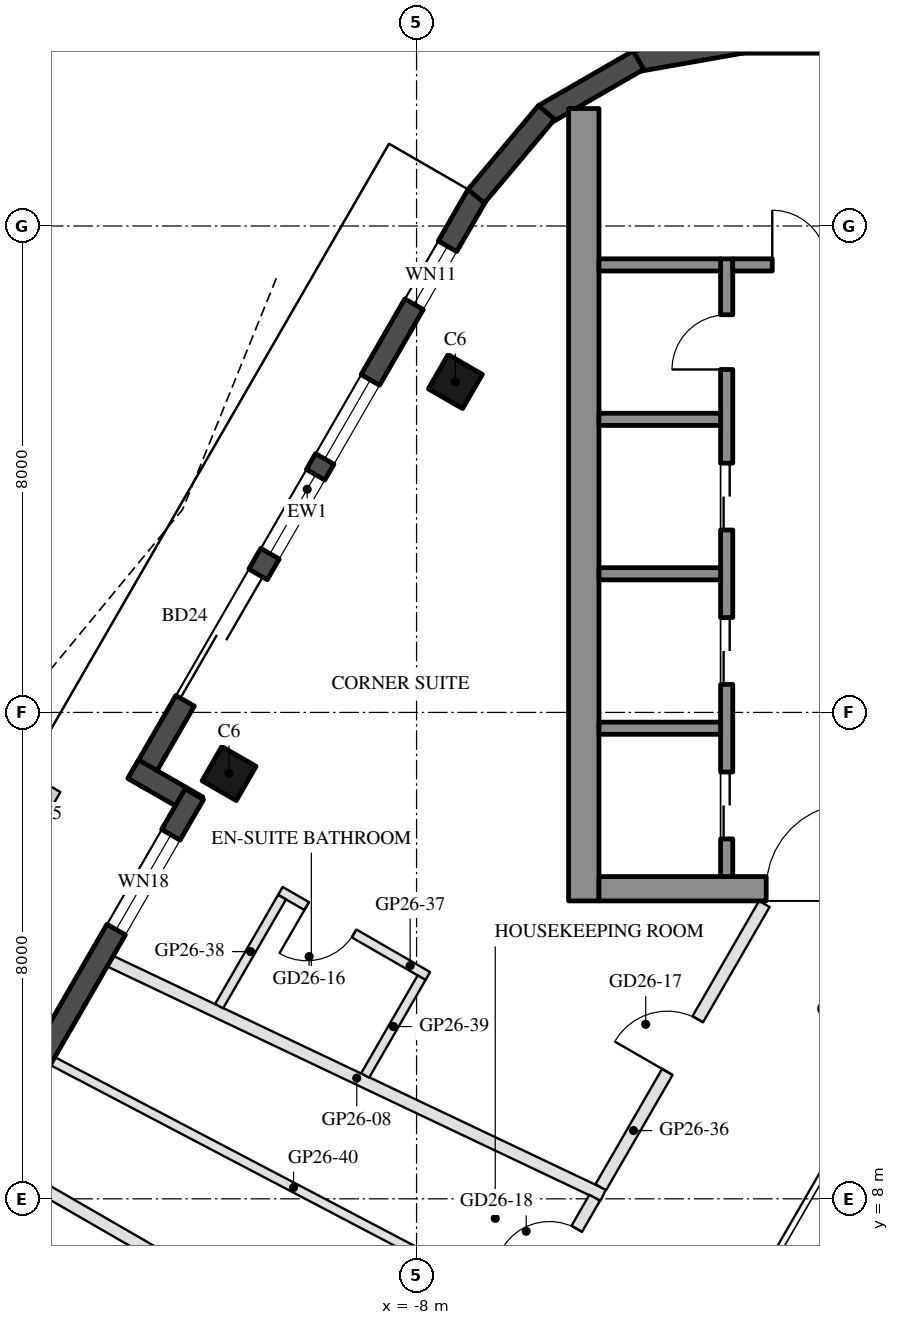
"""IFC4 building model, lengths in metres.
Left out: names, types, materials, properties, quantities, classifications, styles, units other than length and angle.
Written with IfcOpenShell. Run it as: python <this file> out.ifc"""

import sys

from ifc_helpers import new_model, si_unit, direction, frame, frame_2d, origin, origin_2d, place, context, subcontext, project, spatial, rectangle, hollow_rectangle, extrude, boolean, halfspace, element, fill, save


model = new_model("IFC4")
c1 = context("Model", 3, precision=1e-05, world=origin(), true_north=direction((0.0, 1.0)))
c2 = subcontext(c1, "Body", "Model", "MODEL_VIEW")
j1 = project(units=[si_unit("LENGTHUNIT", "METRE"), si_unit("PLANEANGLEUNIT", "RADIAN")], contexts=[c1])
p1 = place(None, origin())
s1 = spatial("IfcSite", under=j1, at=p1, CompositionType="ELEMENT")
p2 = place(p1, origin())
s2 = spatial("IfcBuilding", under=s1, at=p2, CompositionType="ELEMENT")
p3 = place(p2, frame((0.0, 0.0, 268.9)))
s3 = spatial("IfcBuildingStorey", under=s2, at=p3, CompositionType="ELEMENT", Elevation=268.9)
p4 = place(p3, frame((-7.362, 21.44, 0.0), z_axis=(0.0, 0.0, 1.0), x_axis=(0.5, 0.866025403784, 0.0)))
e1 = element("IfcColumn", 1, at=p4, inside=s3, PredefinedType="COLUMN", context=c2, shape_type="SweptSolid", body=[
    boolean("DIFFERENCE", extrude(hollow_rectangle(XDim=0.65, YDim=0.65, WallThickness=0.03, at=origin_2d()), origin(), (0.0, 0.0, 1.0), 3.7), halfspace(frame((0.0, 0.0, 0.047), z_axis=(0.0, 0.0, 1.0), x_axis=(1.0, 0.0, 0.0)), True)),
])
p5 = place(p3, frame((-11.083, 14.994, 0.0), z_axis=(0.0, 0.0, 1.0), x_axis=(0.5, 0.866025403784, 0.0)))
e2 = element("IfcColumn", 2, at=p5, inside=s3, PredefinedType="COLUMN", context=c2, shape_type="SweptSolid", body=[
    boolean("DIFFERENCE", extrude(hollow_rectangle(XDim=0.65, YDim=0.65, WallThickness=0.03, at=origin_2d()), origin(), (0.0, 0.0, 1.0), 3.7), halfspace(frame((0.0, 0.0, 0.04), z_axis=(0.0, 0.0, 1.0), x_axis=(1.0, 0.0, 0.0)), True)),
])
p6 = place(p3, frame((-7.002, 24.514, 0.0), z_axis=(0.0, 0.0, 1.0), x_axis=(-0.500000830309, -0.866024924405, 0.0)))
e3 = element("IfcWall", 3, at=p6, inside=s3, PredefinedType="SOLIDWALL", context=c2, shape_type="SweptSolid", body=[
    extrude(rectangle(XDim=11.185, YDim=0.35, at=frame_2d((5.593, 0.0))), origin(), (0.0, 0.0, 1.0), 3.55),
])
p7 = place(p6, frame((0.979, 0.0, 0.3)))
e4 = element("IfcOpeningElement", 4, at=p7, cuts=e3, PredefinedType="OPENING", context=c2, shape_type="SweptSolid", body=[
    extrude(rectangle(XDim=1.1, YDim=2.65, at=frame_2d((0.55, 1.325))), frame((0.0, 0.185, 0.0), z_axis=(0.0, -1.0, 0.0), x_axis=(1.0, 0.0, 0.0)), (0.0, 0.0, 1.0), 0.37),
])
p8 = place(p6, frame((7.21, 0.0, 0.0)))
e5 = element("IfcOpeningElement", 5, at=p8, cuts=e3, PredefinedType="OPENING", context=c2, shape_type="SweptSolid", body=[
    extrude(rectangle(XDim=2.4, YDim=2.4, at=frame_2d((1.2, 1.2))), frame((0.0, 0.185, 0.0), z_axis=(0.0, -1.0, 0.0), x_axis=(1.0, 0.0, 0.0)), (0.0, 0.0, 1.0), 0.37),
])
p9 = place(p6, frame((3.517, 0.0, 0.3)))
e6 = element("IfcOpeningElement", 6, at=p9, cuts=e3, PredefinedType="OPENING", context=c2, shape_type="SweptSolid", body=[
    extrude(rectangle(XDim=1.5, YDim=2.65, at=frame_2d((0.75, 1.325))), frame((0.0, 0.185, 0.0), z_axis=(0.0, -1.0, 0.0), x_axis=(1.0, 0.0, 0.0)), (0.0, 0.0, 1.0), 0.37),
])
p10 = place(p6, frame((5.316, 0.0, 0.3)))
e7 = element("IfcOpeningElement", 7, at=p10, cuts=e3, PredefinedType="OPENING", context=c2, shape_type="SweptSolid", body=[
    extrude(rectangle(XDim=1.5, YDim=2.65, at=frame_2d((0.75, 1.325))), frame((0.0, 0.185, 0.0), z_axis=(0.0, -1.0, 0.0), x_axis=(1.0, 0.0, 0.0)), (0.0, 0.0, 1.0), 0.37),
])
p11 = place(p3, frame((-12.659, 15.066, 0.0), z_axis=(0.0, 0.0, 1.0), x_axis=(0.866005645448, -0.500034220881, 0.0)))
e8 = element("IfcWall", 8, at=p11, inside=s3, PredefinedType="SOLIDWALL", context=c2, shape_type="SweptSolid", body=[
    extrude(rectangle(XDim=1.22, YDim=0.35, at=frame_2d((0.61, 0.0))), origin(), (0.0, 0.0, 1.0), 3.55),
])
p12 = place(p3, frame((-11.655, 14.655, 0.0), z_axis=(0.0, 0.0, 1.0), x_axis=(-0.499995993298, -0.866027717042, 0.0)))
e9 = element("IfcWall", 9, at=p12, inside=s3, PredefinedType="SOLIDWALL", context=c2, shape_type="SweptSolid", body=[
    extrude(rectangle(XDim=6.284, YDim=0.35, at=frame_2d((3.142, 0.0))), origin(), (0.0, 0.0, 1.0), 3.55),
])
p13 = place(p12, frame((0.77, 0.0, 0.3)))
e10 = element("IfcOpeningElement", 10, at=p13, cuts=e9, PredefinedType="OPENING", context=c2, shape_type="SweptSolid", body=[
    extrude(rectangle(XDim=1.8, YDim=2.65, at=frame_2d((0.9, 1.325))), frame((0.0, 0.185, 0.0), z_axis=(0.0, -1.0, 0.0), x_axis=(1.0, 0.0, 0.0)), (0.0, 0.0, 1.0), 0.37),
])
p14 = place(p3, frame((2.666, 27.018, 0.0), z_axis=(0.0, 0.0, 1.0), x_axis=(-1.0, 0.0, 0.0)))
e11 = element("IfcWall", 11, at=p14, inside=s3, PredefinedType="SOLIDWALL", context=c2, shape_type="SweptSolid", body=[
    extrude(rectangle(XDim=5.331, YDim=0.35, at=frame_2d((2.666, 0.0))), origin(), (0.0, 0.0, 1.0), 3.55),
])
for number, where, z_axis, x_axis in (
    (12, (-2.635, 27.02, 0.0), (0.0, 0.0, 1.0), (-0.985, -0.174, 0.0)),
    (13, (-4.351, 26.729, 0.0), (0.0, 0.0, 1.0), (-0.866, -0.5, 0.0)),
):
    element("IfcWall", number, at=place(p3, frame(where, z_axis=z_axis, x_axis=x_axis)), inside=s3, PredefinedType="SOLIDWALL", context=c2, shape_type="SweptSolid", body=[
        extrude(rectangle(XDim=1.8, YDim=0.35, at=frame_2d((0.9, 0.0))), origin(), (0.0, 0.0, 1.0), 3.55),
    ])
p15 = place(p3, frame((-5.863, 25.868, 0.0), z_axis=(0.0, 0.0, 1.0), x_axis=(-0.642756114672, -0.766070869471, 0.0)))
e14 = element("IfcWall", 14, at=p15, inside=s3, PredefinedType="SOLIDWALL", context=c2, shape_type="SweptSolid", body=[
    extrude(rectangle(XDim=1.8, YDim=0.35, at=frame_2d((0.9, 0.0))), origin(), (0.0, 0.0, 1.0), 3.55),
])
p16 = place(p3, frame((-5.25, 12.9, 0.0), z_axis=(0.0, 0.0, 1.0), x_axis=(0.0, 1.0, 0.0)))
e15 = element("IfcWall", 15, at=p16, inside=s3, PredefinedType="SHEAR", context=c2, shape_type="SweptSolid", body=[
    extrude(rectangle(XDim=13.031, YDim=0.5, at=frame_2d((6.516, 0.0))), origin(), (0.0, 0.0, 1.0), 3.5),
])
p17 = place(p3, frame((5.0, 13.1, 0.0), z_axis=(0.0, 0.0, 1.0), x_axis=(-1.0, 0.0, 0.0)))
e16 = element("IfcWall", 16, at=p17, inside=s3, PredefinedType="SHEAR", context=c2, shape_type="SweptSolid", body=[
    extrude(rectangle(XDim=10.0, YDim=0.4, at=frame_2d((5.0, 0.0))), origin(), (0.0, 0.0, 1.0), 3.5),
])
p18 = place(p17, frame((3.55, 0.0, 0.0)))
e17 = element("IfcOpeningElement", 17, at=p18, cuts=e16, PredefinedType="OPENING", context=c2, shape_type="SweptSolid", body=[
    extrude(rectangle(XDim=1.1, YDim=2.1, at=frame_2d((0.55, 1.05))), frame((0.0, 0.21, 0.0), z_axis=(0.0, -1.0, 0.0), x_axis=(1.0, 0.0, 0.0)), (0.0, 0.0, 1.0), 0.42),
])
p19 = place(p17, frame((5.85, 0.0, 0.0)))
e18 = element("IfcOpeningElement", 18, at=p19, cuts=e16, PredefinedType="OPENING", context=c2, shape_type="SweptSolid", body=[
    extrude(rectangle(XDim=1.4, YDim=2.1, at=frame_2d((0.7, 1.05))), frame((0.0, 0.21, 0.0), z_axis=(0.0, -1.0, 0.0), x_axis=(1.0, 0.0, 0.0)), (0.0, 0.0, 1.0), 0.42),
])
p20 = place(p3, frame((-2.9, 13.3, 0.0), z_axis=(0.0, 0.0, 1.0), x_axis=(0.0, 1.0, 0.0)))
e19 = element("IfcWall", 19, at=p20, inside=s3, PredefinedType="SHEAR", context=c2, shape_type="SweptSolid", body=[
    extrude(rectangle(XDim=10.16, YDim=0.2, at=frame_2d((5.08, 0.0))), origin(), (0.0, 0.0, 1.0), 3.5),
])
p21 = place(p20, frame((0.62, 0.0, 0.0)))
e20 = element("IfcOpeningElement", 20, at=p21, cuts=e19, PredefinedType="OPENING", context=c2, shape_type="SweptSolid", body=[
    extrude(rectangle(XDim=1.1, YDim=2.1, at=frame_2d((0.55, 1.05))), frame((0.0, 0.11, 0.0), z_axis=(0.0, -1.0, 0.0), x_axis=(1.0, 0.0, 0.0)), (0.0, 0.0, 1.0), 0.22),
])
p22 = place(p20, frame((3.16, 0.0, 0.0)))
e21 = element("IfcOpeningElement", 21, at=p22, cuts=e19, PredefinedType="OPENING", context=c2, shape_type="SweptSolid", body=[
    extrude(rectangle(XDim=1.1, YDim=2.1, at=frame_2d((0.55, 1.05))), frame((0.0, 0.11, 0.0), z_axis=(0.0, -1.0, 0.0), x_axis=(1.0, 0.0, 0.0)), (0.0, 0.0, 1.0), 0.22),
])
p23 = place(p20, frame((5.7, 0.0, 0.0)))
e22 = element("IfcOpeningElement", 22, at=p23, cuts=e19, PredefinedType="OPENING", context=c2, shape_type="SweptSolid", body=[
    extrude(rectangle(XDim=1.1, YDim=2.1, at=frame_2d((0.55, 1.05))), frame((0.0, 0.11, 0.0), z_axis=(0.0, -1.0, 0.0), x_axis=(1.0, 0.0, 0.0)), (0.0, 0.0, 1.0), 0.22),
])
p24 = place(p20, frame((8.34, 0.0, 0.0)))
e23 = element("IfcOpeningElement", 23, at=p24, cuts=e19, PredefinedType="OPENING", context=c2, shape_type="SweptSolid", body=[
    extrude(rectangle(XDim=0.9, YDim=2.1, at=frame_2d((0.45, 1.05))), frame((0.0, 0.11, 0.0), z_axis=(0.0, -1.0, 0.0), x_axis=(1.0, 0.0, 0.0)), (0.0, 0.0, 1.0), 0.22),
])
p25 = place(p3, frame((-0.4, 23.36, 0.0), z_axis=(0.0, 0.0, 1.0), x_axis=(-1.0, 0.0, 0.0)))
e24 = element("IfcWall", 24, at=p25, inside=s3, PredefinedType="SHEAR", context=c2, shape_type="SweptSolid", body=[
    extrude(rectangle(XDim=2.4, YDim=0.2, at=frame_2d((1.2, 0.0))), origin(), (0.0, 0.0, 1.0), 3.5),
])
p26 = place(p25, frame((0.85, 0.0, 0.0)))
e25 = element("IfcOpeningElement", 25, at=p26, cuts=e24, PredefinedType="OPENING", context=c2, shape_type="SweptSolid", body=[
    extrude(rectangle(XDim=0.9, YDim=2.1, at=frame_2d((0.45, 1.05))), frame((0.0, 0.11, 0.0), z_axis=(0.0, -1.0, 0.0), x_axis=(1.0, 0.0, 0.0)), (0.0, 0.0, 1.0), 0.22),
])
for number, where, z_axis, x_axis in (
    (26, (-3.0, 15.74, 0.0), (0.0, 0.0, 1.0), (-1.0, 0.0, 0.0)),
    (27, (-3.0, 18.28, 0.0), (0.0, 0.0, 1.0), (-1.0, 0.0, 0.0)),
    (28, (-3.0, 20.82, 0.0), (0.0, 0.0, 1.0), (-1.0, 0.0, 0.0)),
    (29, (-3.0, 23.36, 0.0), (0.0, 0.0, 1.0), (-1.0, 0.0, 0.0)),
):
    element("IfcWall", number, at=place(p3, frame(where, z_axis=z_axis, x_axis=x_axis)), inside=s3, PredefinedType="SHEAR", context=c2, shape_type="SweptSolid", body=[
        extrude(rectangle(XDim=2.0, YDim=0.2, at=frame_2d((1.0, 0.0))), origin(), (0.0, 0.0, 1.0), 3.5),
    ])
p27 = place(p3, frame((-13.038, 11.909, 0.0), z_axis=(0.0, 0.0, 1.0), x_axis=(0.903427417518, -0.428741065536, 0.0)))
e30 = element("IfcWall", 30, at=p27, inside=s3, PredefinedType="PARTITIONING", context=c2, shape_type="SweptSolid", body=[
    extrude(rectangle(XDim=8.975, YDim=0.2, at=frame_2d((4.487, 0.0))), origin(), (0.0, 0.0, 1.0), 3.0),
])
p28 = place(p3, frame((-14.524, 8.385, 0.0), z_axis=(0.0, 0.0, 1.0), x_axis=(0.866015680395, -0.500016841027, 0.0)))
e31 = element("IfcWall", 31, at=p28, inside=s3, PredefinedType="PARTITIONING", context=c2, shape_type="SweptSolid", body=[
    extrude(rectangle(XDim=8.471, YDim=0.2, at=frame_2d((4.235, 0.0))), origin(), (0.0, 0.0, 1.0), 3.0),
])
p29 = place(p3, frame((-4.97, 8.191, 0.0), z_axis=(0.0, 0.0, 1.0), x_axis=(0.499994808408, 0.866028401131, 0.0)))
e32 = element("IfcWall", 32, at=p29, inside=s3, PredefinedType="PARTITIONING", context=c2, shape_type="SweptSolid", body=[
    extrude(rectangle(XDim=5.38, YDim=0.2, at=frame_2d((2.69, 0.0))), origin(), (0.0, 0.0, 1.0), 3.0),
])
p30 = place(p29, frame((2.19, 0.0, 0.0)))
e33 = element("IfcOpeningElement", 33, at=p30, cuts=e32, PredefinedType="OPENING", context=c2, shape_type="SweptSolid", body=[
    extrude(rectangle(XDim=1.0, YDim=2.1, at=frame_2d((0.5, 1.05))), frame((0.0, 0.11, 0.0), z_axis=(0.0, -1.0, 0.0), x_axis=(1.0, 0.0, 0.0)), (0.0, 0.0, 1.0), 0.22),
])
p31 = place(p3, frame((-7.815, 11.665, 0.0), z_axis=(0.0, 0.0, 1.0), x_axis=(-0.865996816683, 0.500049511043, 0.0)))
e34 = element("IfcWall", 34, at=p31, inside=s3, PredefinedType="PARTITIONING", context=c2, shape_type="SweptSolid", body=[
    extrude(rectangle(XDim=2.8, YDim=0.15, at=frame_2d((1.4, 0.0))), origin(), (0.0, 0.0, 1.0), 3.55),
])
p32 = place(p31, frame((1.4, 0.0, 0.0)))
e35 = element("IfcOpeningElement", 35, at=p32, cuts=e34, PredefinedType="OPENING", context=c2, shape_type="SweptSolid", body=[
    extrude(rectangle(XDim=0.9, YDim=2.1, at=frame_2d((0.45, 1.05))), frame((0.0, 0.085, 0.0), z_axis=(0.0, -1.0, 0.0), x_axis=(1.0, 0.0, 0.0)), (0.0, 0.0, 1.0), 0.17),
])
p33 = place(p3, frame((-10.212, 12.962, 0.0), z_axis=(0.0, 0.0, 1.0), x_axis=(-0.500008344384, -0.866020586098, 0.0)))
e36 = element("IfcWall", 36, at=p33, inside=s3, PredefinedType="PARTITIONING", context=c2, shape_type="SweptSolid", body=[
    extrude(rectangle(XDim=2.07, YDim=0.15, at=frame_2d((1.035, 0.0))), origin(), (0.0, 0.0, 1.0), 3.55),
])
p34 = place(p3, frame((-7.917, 11.637, 0.0), z_axis=(0.0, 0.0, 1.0), x_axis=(-0.500071598593, -0.865984062371, 0.0)))
e37 = element("IfcWall", 37, at=p34, inside=s3, PredefinedType="PARTITIONING", context=c2, shape_type="SweptSolid", body=[
    extrude(rectangle(XDim=1.856, YDim=0.15, at=frame_2d((0.928, 0.0))), origin(), (0.0, 0.0, 1.0), 3.55),
])
p35 = place(p3, frame((-13.987, 10.266, 0.0), z_axis=(0.0, 0.0, 1.0), x_axis=(0.885474206285, -0.464688530097, 0.0)))
e38 = element("IfcWall", 38, at=p35, inside=s3, PredefinedType="PARTITIONING", context=c2, shape_type="SweptSolid", body=[
    extrude(rectangle(XDim=8.953, YDim=0.15, at=frame_2d((4.477, 0.0))), origin(), (0.0, 0.0, 1.0), 3.16),
])
p36 = place(p3, frame((-6.11, 6.217, 0.0), z_axis=(0.0, 0.0, 1.0), x_axis=(0.500017307165, 0.866015411258, 0.0)))
e39 = element("IfcWall", 39, at=p36, inside=s3, PredefinedType="PARTITIONING", context=c2, shape_type="SweptSolid", body=[
    extrude(rectangle(XDim=2.079, YDim=0.2, at=frame_2d((1.039, 0.0))), origin(), (0.0, 0.0, 1.0), 3.0),
])
p37 = place(p36, frame((0.589, 0.0, 0.0)))
e40 = element("IfcOpeningElement", 40, at=p37, cuts=e39, PredefinedType="OPENING", context=c2, shape_type="SweptSolid", body=[
    extrude(rectangle(XDim=0.9, YDim=2.1, at=frame_2d((0.45, 1.05))), frame((0.0, 0.11, 0.0), z_axis=(0.0, -1.0, 0.0), x_axis=(1.0, 0.0, 0.0)), (0.0, 0.0, 1.0), 0.22),
])
p38 = place(p7, origin())
e41 = element("IfcWindow", 41, at=p38, inside=s3, PartitioningType="SINGLE_PANEL", PredefinedType="WINDOW", context=c2, shape_type="SweptSolid", body=[
    extrude(rectangle(XDim=1.1, YDim=2.65, at=frame_2d((0.55, 1.325))), frame((0.0, 0.03, 0.0), z_axis=(0.0, -1.0, 0.0), x_axis=(1.0, 0.0, 0.0)), (0.0, 0.0, 1.0), 0.06),
])
fill(e4, e41)
p39 = place(p8, frame((2.4, 0.0, 0.0), z_axis=(0.0, 0.0, 1.0), x_axis=(-1.0, 0.0, 0.0)))
e42 = element("IfcDoor", 42, at=p39, inside=s3, OperationType="SLIDING_TO_LEFT", PredefinedType="DOOR", context=c2, shape_type="SweptSolid", body=[
    extrude(rectangle(XDim=2.4, YDim=2.4, at=frame_2d((1.2, 1.2))), frame((0.0, 0.025, 0.0), z_axis=(0.0, -1.0, 0.0), x_axis=(1.0, 0.0, 0.0)), (0.0, 0.0, 1.0), 0.05),
])
fill(e5, e42)
p40 = place(p9, origin())
e43 = element("IfcWindow", 43, at=p40, inside=s3, PartitioningType="SINGLE_PANEL", PredefinedType="WINDOW", context=c2, shape_type="SweptSolid", body=[
    extrude(rectangle(XDim=1.5, YDim=2.65, at=frame_2d((0.75, 1.325))), frame((0.0, 0.03, 0.0), z_axis=(0.0, -1.0, 0.0), x_axis=(1.0, 0.0, 0.0)), (0.0, 0.0, 1.0), 0.06),
])
fill(e6, e43)
p41 = place(p10, origin())
e44 = element("IfcWindow", 44, at=p41, inside=s3, PartitioningType="SINGLE_PANEL", PredefinedType="WINDOW", context=c2, shape_type="SweptSolid", body=[
    extrude(rectangle(XDim=1.5, YDim=2.65, at=frame_2d((0.75, 1.325))), frame((0.0, 0.03, 0.0), z_axis=(0.0, -1.0, 0.0), x_axis=(1.0, 0.0, 0.0)), (0.0, 0.0, 1.0), 0.06),
])
fill(e7, e44)
p42 = place(p13, origin())
e45 = element("IfcWindow", 45, at=p42, inside=s3, PartitioningType="SINGLE_PANEL", PredefinedType="WINDOW", context=c2, shape_type="SweptSolid", body=[
    extrude(rectangle(XDim=1.8, YDim=2.65, at=frame_2d((0.9, 1.325))), frame((0.0, 0.03, 0.0), z_axis=(0.0, -1.0, 0.0), x_axis=(1.0, 0.0, 0.0)), (0.0, 0.0, 1.0), 0.06),
])
fill(e10, e45)
p43 = place(p21, origin())
e46 = element("IfcDoor", 46, at=p43, inside=s3, OperationType="DOUBLE_DOOR_SLIDING", PredefinedType="DOOR", context=c2, shape_type="SweptSolid", body=[
    extrude(rectangle(XDim=1.1, YDim=2.1, at=frame_2d((0.55, 1.05))), frame((0.0, 0.025, 0.0), z_axis=(0.0, -1.0, 0.0), x_axis=(1.0, 0.0, 0.0)), (0.0, 0.0, 1.0), 0.05),
])
fill(e20, e46)
p44 = place(p22, origin())
e47 = element("IfcDoor", 47, at=p44, inside=s3, OperationType="DOUBLE_DOOR_SLIDING", PredefinedType="DOOR", context=c2, shape_type="SweptSolid", body=[
    extrude(rectangle(XDim=1.1, YDim=2.1, at=frame_2d((0.55, 1.05))), frame((0.0, 0.025, 0.0), z_axis=(0.0, -1.0, 0.0), x_axis=(1.0, 0.0, 0.0)), (0.0, 0.0, 1.0), 0.05),
])
fill(e21, e47)
p45 = place(p23, origin())
e48 = element("IfcDoor", 48, at=p45, inside=s3, OperationType="DOUBLE_DOOR_SLIDING", PredefinedType="DOOR", context=c2, shape_type="SweptSolid", body=[
    extrude(rectangle(XDim=1.1, YDim=2.1, at=frame_2d((0.55, 1.05))), frame((0.0, 0.025, 0.0), z_axis=(0.0, -1.0, 0.0), x_axis=(1.0, 0.0, 0.0)), (0.0, 0.0, 1.0), 0.05),
])
fill(e22, e48)
p46 = place(p24, origin())
e49 = element("IfcDoor", 49, at=p46, inside=s3, OperationType="SINGLE_SWING_LEFT", PredefinedType="DOOR", context=c2, shape_type="SweptSolid", body=[
    extrude(rectangle(XDim=0.9, YDim=2.1, at=frame_2d((0.45, 1.05))), frame((0.0, 0.025, 0.0), z_axis=(0.0, -1.0, 0.0), x_axis=(1.0, 0.0, 0.0)), (0.0, 0.0, 1.0), 0.05),
])
fill(e23, e49)
p47 = place(p26, frame((0.9, 0.0, 0.0), z_axis=(0.0, 0.0, 1.0), x_axis=(-1.0, 0.0, 0.0)))
e50 = element("IfcDoor", 50, at=p47, inside=s3, OperationType="SINGLE_SWING_LEFT", PredefinedType="DOOR", context=c2, shape_type="SweptSolid", body=[
    extrude(rectangle(XDim=0.9, YDim=2.1, at=frame_2d((0.45, 1.05))), frame((0.0, 0.025, 0.0), z_axis=(0.0, -1.0, 0.0), x_axis=(1.0, 0.0, 0.0)), (0.0, 0.0, 1.0), 0.05),
])
fill(e25, e50)
p48 = place(p19, frame((1.4, 0.0, 0.0), z_axis=(0.0, 0.0, 1.0), x_axis=(-1.0, 0.0, 0.0)))
e51 = element("IfcDoor", 51, at=p48, inside=s3, OperationType="DOUBLE_DOOR_SINGLE_SWING", PredefinedType="DOOR", context=c2, shape_type="SweptSolid", body=[
    extrude(rectangle(XDim=1.4, YDim=2.1, at=frame_2d((0.7, 1.05))), frame((0.0, 0.025, 0.0), z_axis=(0.0, -1.0, 0.0), x_axis=(1.0, 0.0, 0.0)), (0.0, 0.0, 1.0), 0.05),
])
fill(e18, e51)
p49 = place(p32, origin())
e52 = element("IfcDoor", 52, at=p49, inside=s3, OperationType="SINGLE_SWING_RIGHT", PredefinedType="DOOR", context=c2, shape_type="SweptSolid", body=[
    extrude(rectangle(XDim=0.9, YDim=2.1, at=frame_2d((0.45, 1.05))), frame((0.0, 0.025, 0.0), z_axis=(0.0, -1.0, 0.0), x_axis=(1.0, 0.0, 0.0)), (0.0, 0.0, 1.0), 0.05),
])
fill(e35, e52)
p50 = place(p30, origin())
e53 = element("IfcDoor", 53, at=p50, inside=s3, OperationType="SINGLE_SWING_LEFT", PredefinedType="DOOR", context=c2, shape_type="SweptSolid", body=[
    extrude(rectangle(XDim=1.0, YDim=2.1, at=frame_2d((0.5, 1.05))), frame((0.0, 0.025, 0.0), z_axis=(0.0, -1.0, 0.0), x_axis=(1.0, 0.0, 0.0)), (0.0, 0.0, 1.0), 0.05),
])
fill(e33, e53)
p51 = place(p37, origin())
e54 = element("IfcDoor", 54, at=p51, inside=s3, OperationType="SINGLE_SWING_LEFT", PredefinedType="DOOR", context=c2, shape_type="SweptSolid", body=[
    extrude(rectangle(XDim=0.9, YDim=2.1, at=frame_2d((0.45, 1.05))), frame((0.0, 0.025, 0.0), z_axis=(0.0, -1.0, 0.0), x_axis=(1.0, 0.0, 0.0)), (0.0, 0.0, 1.0), 0.05),
])
fill(e40, e54)
save(model, sys.argv[1])
